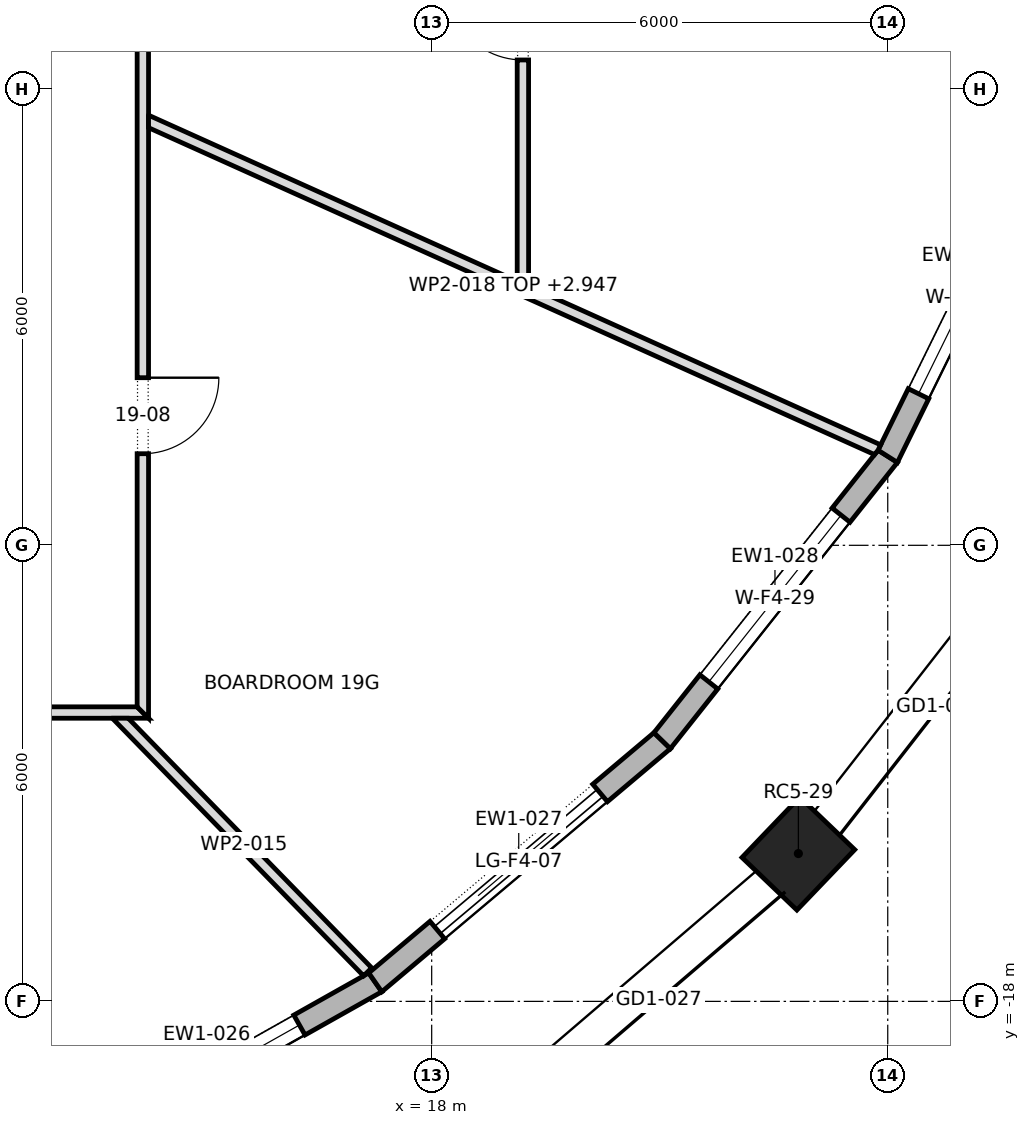
"""IFC4 building model, lengths in metres.
Left out: names, types, materials, properties, quantities, classifications, styles, units other than length and angle.
Written with IfcOpenShell. Run it as: python <this file> out.ifc"""

import sys

from ifc_helpers import new_model, si_unit, direction, frame, frame_2d, origin, origin_2d, place, context, subcontext, project, spatial, polyline, rectangle, outline, extrude, element, fill, save


model = new_model("IFC4")
c1 = context("Model", 3, precision=1e-05, world=origin(), true_north=direction((0.0, 1.0)))
c2 = subcontext(c1, "Body", "Model", "MODEL_VIEW")
j1 = project(units=[si_unit("LENGTHUNIT", "METRE"), si_unit("PLANEANGLEUNIT", "RADIAN")], contexts=[c1])
p1 = place(None, origin())
s1 = spatial("IfcSite", under=j1, at=p1, CompositionType="ELEMENT")
p2 = place(p1, origin())
s2 = spatial("IfcBuilding", under=s1, at=p2, CompositionType="ELEMENT")
p3 = place(p2, frame((0.0, 0.0, 276.3)))
s3 = spatial("IfcBuildingStorey", under=s2, at=p3, CompositionType="ELEMENT", Elevation=276.3)
p4 = place(p3, frame((22.824, -16.055, 0.0), z_axis=(0.0, 0.0, 1.0), x_axis=(0.691577351953, 0.722302406382, 0.0)))
e1 = element("IfcColumn", 1, at=p4, inside=s3, PredefinedType="COLUMN", context=c2, shape_type="SweptSolid", body=[
    extrude(rectangle(XDim=1.1, YDim=1.0, at=origin_2d()), origin(), (0.0, 0.0, 1.0), 4.0),
])
p5 = place(p3, frame((12.822, -20.246, 0.0), z_axis=(0.0, 0.0, 1.0), x_axis=(0.871433320402, 0.490513983585, 0.0)))
e2 = element("IfcWall", 2, at=p5, inside=s3, PredefinedType="STANDARD", context=c2, shape_type="SweptSolid", body=[
    extrude(outline(polyline([(-0.013, -0.15), (5.104, -0.15), (5.076, 0.15), (0.013, 0.15), (-0.013, -0.15)])), origin(), (0.0, 0.0, 1.0), 3.7),
])
p6 = place(p5, frame((1.145, 0.0, 0.6)))
e3 = element("IfcOpeningElement", 3, at=p6, cuts=e2, PredefinedType="OPENING", context=c2, shape_type="SweptSolid", body=[
    extrude(rectangle(XDim=2.8, YDim=2.65, at=frame_2d((1.4, 1.325))), frame((0.0, 0.162, 0.0), z_axis=(0.0, -1.0, 0.0), x_axis=(1.0, 0.0, 0.0)), (0.0, 0.0, 1.0), 0.324),
])
p7 = place(p3, frame((17.258, -17.75, 0.0), z_axis=(0.0, 0.0, 1.0), x_axis=(0.764832940795, 0.644228664897, 0.0)))
e4 = element("IfcWall", 4, at=p7, inside=s3, PredefinedType="STANDARD", context=c2, shape_type="SweptSolid", body=[
    extrude(outline(polyline([(-0.014, -0.15), (4.95, -0.15), (4.92, 0.15), (0.014, 0.15), (-0.014, -0.15)])), origin(), (0.0, 0.0, 1.0), 3.7),
])
p8 = place(p7, frame((1.068, 0.0, 0.0)))
e5 = element("IfcOpeningElement", 5, at=p8, cuts=e4, PredefinedType="OPENING", context=c2, shape_type="SweptSolid", body=[
    extrude(rectangle(XDim=2.8, YDim=3.25, at=frame_2d((1.4, 1.625))), frame((0.0, 0.162, 0.0), z_axis=(0.0, -1.0, 0.0), x_axis=(1.0, 0.0, 0.0)), (0.0, 0.0, 1.0), 0.324),
])
p9 = place(p3, frame((21.032, -14.57, 0.0), z_axis=(0.0, 0.0, 1.0), x_axis=(0.621434755851, 0.783465917715, 0.0)))
e6 = element("IfcWall", 6, at=p9, inside=s3, PredefinedType="STANDARD", context=c2, shape_type="SweptSolid", body=[
    extrude(outline(polyline([(-0.015, -0.15), (4.791, -0.15), (4.759, 0.15), (0.015, 0.15), (-0.015, -0.15)])), origin(), (0.0, 0.0, 1.0), 3.7),
])
p10 = place(p9, frame((0.987, 0.0, 0.6)))
e7 = element("IfcOpeningElement", 7, at=p10, cuts=e6, PredefinedType="OPENING", context=c2, shape_type="SweptSolid", body=[
    extrude(rectangle(XDim=2.8, YDim=2.65, at=frame_2d((1.4, 1.325))), frame((0.0, 0.162, 0.0), z_axis=(0.0, -1.0, 0.0), x_axis=(1.0, 0.0, 0.0)), (0.0, 0.0, 1.0), 0.324),
])
p11 = place(p3, frame((24.0, -10.829, 0.0), z_axis=(0.0, 0.0, 1.0), x_axis=(0.441261940724, 0.897378348117, 0.0)))
e8 = element("IfcWall", 8, at=p11, inside=s3, PredefinedType="STANDARD", context=c2, shape_type="SweptSolid", body=[
    extrude(outline(polyline([(-0.016, -0.15), (4.652, -0.15), (4.618, 0.15), (0.016, 0.15), (-0.016, -0.15)])), origin(), (0.0, 0.0, 1.0), 3.7),
])
p12 = place(p11, frame((0.917, 0.0, 0.6)))
e9 = element("IfcOpeningElement", 9, at=p12, cuts=e8, PredefinedType="OPENING", context=c2, shape_type="SweptSolid", body=[
    extrude(rectangle(XDim=2.8, YDim=2.65, at=frame_2d((1.4, 1.325))), frame((0.0, 0.162, 0.0), z_axis=(0.0, -1.0, 0.0), x_axis=(1.0, 0.0, 0.0)), (0.0, 0.0, 1.0), 0.324),
])
p13 = place(p3, frame((-14.275, -14.2, 0.0), z_axis=(0.0, 0.0, 1.0), x_axis=(1.0, 0.0, 0.0)))
e10 = element("IfcWall", 10, at=p13, inside=s3, PredefinedType="PARTITIONING", context=c2, shape_type="SweptSolid", body=[
    extrude(outline(polyline([(28.55, -0.075), (28.55, -0.075), (28.4, 0.075), (26.517, 0.075), (24.633, 0.075), (22.75, 0.075), (20.866, 0.075), (18.983, 0.075), (17.1, 0.075), (15.217, 0.075), (13.333, 0.075), (11.45, 0.075), (9.567, 0.075), (7.683, 0.075), (5.8, 0.075), (3.917, 0.075), (2.033, 0.075), (0.15, 0.075), (0.0, -0.075), (1.903, -0.075), (3.807, -0.075), (5.71, -0.075), (7.613, -0.075), (9.517, -0.075), (11.42, -0.075), (13.323, -0.075), (15.227, -0.075), (17.13, -0.075), (19.033, -0.075), (20.937, -0.075), (22.84, -0.075), (24.743, -0.075), (26.646, -0.075), (28.55, -0.075)])), origin(), (0.0, 0.0, 1.0), 3.7),
])
p14 = place(p13, frame((4.305, 0.0, 0.0)))
e11 = element("IfcOpeningElement", 11, at=p14, cuts=e10, PredefinedType="OPENING", context=c2, shape_type="SweptSolid", body=[
    extrude(rectangle(XDim=1.0, YDim=2.1, at=frame_2d((0.5, 1.05))), frame((0.0, 0.087, 0.0), z_axis=(0.0, -1.0, 0.0), x_axis=(1.0, 0.0, 0.0)), (0.0, 0.0, 1.0), 0.174),
])
p15 = place(p13, frame((17.735, 0.0, 0.0)))
e12 = element("IfcOpeningElement", 12, at=p15, cuts=e10, PredefinedType="OPENING", context=c2, shape_type="SweptSolid", body=[
    extrude(rectangle(XDim=1.8, YDim=2.1, at=frame_2d((0.9, 1.05))), frame((0.0, 0.087, 0.0), z_axis=(0.0, -1.0, 0.0), x_axis=(1.0, 0.0, 0.0)), (0.0, 0.0, 1.0), 0.174),
])
p16 = place(p3, frame((13.852, -14.223, 0.0), z_axis=(0.0, 0.0, 1.0), x_axis=(0.69820654799, -0.715896372629, 0.0)))
e13 = element("IfcWall", 13, at=p16, inside=s3, PredefinedType="PARTITIONING", context=c2, shape_type="SweptSolid", body=[
    extrude(outline(polyline([(0.0, -0.075), (1.578, -0.075), (3.156, -0.075), (4.734, -0.075), (4.734, -0.075), (4.734, 0.075), (3.205, 0.075), (1.675, 0.075), (0.146, 0.075), (0.0, -0.075), (0.0, -0.075)])), origin(), (0.0, 0.0, 1.0), 3.7),
])
p17 = place(p3, frame((14.2, -14.275, 0.0), z_axis=(0.0, 0.0, 1.0), x_axis=(0.0, 1.0, 0.0)))
e14 = element("IfcWall", 14, at=p17, inside=s3, PredefinedType="PARTITIONING", context=c2, shape_type="SweptSolid", body=[
    extrude(outline(polyline([(28.55, -0.075), (28.55, -0.075), (28.4, 0.075), (26.517, 0.075), (24.633, 0.075), (22.75, 0.075), (20.866, 0.075), (18.983, 0.075), (17.1, 0.075), (15.217, 0.075), (13.333, 0.075), (11.45, 0.075), (9.567, 0.075), (7.683, 0.075), (5.8, 0.075), (3.917, 0.075), (2.033, 0.075), (0.15, 0.075), (0.0, -0.075), (1.903, -0.075), (3.807, -0.075), (5.71, -0.075), (7.613, -0.075), (9.517, -0.075), (11.42, -0.075), (13.323, -0.075), (15.227, -0.075), (17.13, -0.075), (19.033, -0.075), (20.937, -0.075), (22.84, -0.075), (24.743, -0.075), (26.646, -0.075), (28.55, -0.075)])), origin(), (0.0, 0.0, 1.0), 3.7),
])
p18 = place(p17, frame((3.48, 0.0, 0.0)))
e15 = element("IfcOpeningElement", 15, at=p18, cuts=e14, PredefinedType="OPENING", context=c2, shape_type="SweptSolid", body=[
    extrude(rectangle(XDim=1.0, YDim=2.1, at=frame_2d((0.5, 1.05))), frame((0.0, 0.087, 0.0), z_axis=(0.0, -1.0, 0.0), x_axis=(1.0, 0.0, 0.0)), (0.0, 0.0, 1.0), 0.174),
])
p19 = place(p17, frame((9.99, 0.0, 0.0)))
e16 = element("IfcOpeningElement", 16, at=p19, cuts=e14, PredefinedType="OPENING", context=c2, shape_type="SweptSolid", body=[
    extrude(rectangle(XDim=1.0, YDim=2.1, at=frame_2d((0.5, 1.05))), frame((0.0, 0.087, 0.0), z_axis=(0.0, -1.0, 0.0), x_axis=(1.0, 0.0, 0.0)), (0.0, 0.0, 1.0), 0.174),
])
p20 = place(p17, frame((15.0, 0.0, 0.0)))
e17 = element("IfcOpeningElement", 17, at=p20, cuts=e14, PredefinedType="OPENING", context=c2, shape_type="SweptSolid", body=[
    extrude(rectangle(XDim=1.0, YDim=2.1, at=frame_2d((0.5, 1.05))), frame((0.0, 0.087, 0.0), z_axis=(0.0, -1.0, 0.0), x_axis=(1.0, 0.0, 0.0)), (0.0, 0.0, 1.0), 0.174),
])
p21 = place(p17, frame((22.69, 0.0, 0.0)))
e18 = element("IfcOpeningElement", 18, at=p21, cuts=e14, PredefinedType="OPENING", context=c2, shape_type="SweptSolid", body=[
    extrude(rectangle(XDim=1.0, YDim=2.1, at=frame_2d((0.5, 1.05))), frame((0.0, 0.087, 0.0), z_axis=(0.0, -1.0, 0.0), x_axis=(1.0, 0.0, 0.0)), (0.0, 0.0, 1.0), 0.174),
])
p22 = place(p3, frame((14.245, -6.41, 0.0), z_axis=(0.0, 0.0, 1.0), x_axis=(0.91183931518, -0.410547272908, 0.0)))
e19 = element("IfcWall", 19, at=p22, inside=s3, PredefinedType="PARTITIONING", context=c2, shape_type="SweptSolid", body=[
    extrude(outline(polyline([(0.067, -0.075), (1.813, -0.075), (3.559, -0.075), (5.304, -0.075), (7.05, -0.075), (8.796, -0.075), (10.542, -0.075), (10.56, -0.003), (10.562, 0.073), (10.562, 0.075), (8.816, 0.075), (7.07, 0.075), (5.324, 0.075), (5.319, 0.073), (5.318, 0.075), (3.546, 0.075), (1.773, 0.075), (0.0, 0.075), (0.0, 0.074), (0.067, -0.075)])), origin(), (0.0, 0.0, 1.0), 2.947),
])
p23 = place(p3, frame((19.2, -1.664, 0.0), z_axis=(0.0, 0.0, 1.0), x_axis=(0.0, -1.0, 0.0)))
e20 = element("IfcWall", 20, at=p23, inside=s3, PredefinedType="PARTITIONING", context=c2, shape_type="SweptSolid", body=[
    extrude(outline(polyline([(0.0, -0.075), (1.715, -0.075), (3.431, -0.075), (5.146, -0.075), (6.862, -0.075), (6.929, 0.074), (6.929, 0.075), (5.2, 0.075), (3.47, 0.075), (1.741, 0.075), (0.012, 0.075), (0.0, -0.07), (0.0, -0.075)])), origin(), (0.0, 0.0, 1.0), 3.7),
])
p24 = place(p23, frame((2.951, 0.0, 0.0)))
e21 = element("IfcOpeningElement", 21, at=p24, cuts=e20, PredefinedType="OPENING", context=c2, shape_type="SweptSolid", body=[
    extrude(rectangle(XDim=1.0, YDim=2.1, at=frame_2d((0.5, 1.05))), frame((0.0, 0.087, 0.0), z_axis=(0.0, -1.0, 0.0), x_axis=(1.0, 0.0, 0.0)), (0.0, 0.0, 1.0), 0.174),
])
p25 = place(p6, origin())
e22 = element("IfcWindow", 22, at=p25, inside=s3, PartitioningType="DOUBLE_PANEL_VERTICAL", PredefinedType="WINDOW", context=c2, shape_type="SweptSolid", body=[
    extrude(rectangle(XDim=2.8, YDim=2.65, at=frame_2d((1.4, 1.325))), frame((0.0, 0.03, 0.0), z_axis=(0.0, -1.0, 0.0), x_axis=(1.0, 0.0, 0.0)), (0.0, 0.0, 1.0), 0.06),
])
fill(e3, e22)
p26 = place(p8, origin())
e23 = element("IfcDoor", 23, at=p26, inside=s3, OperationType="DOUBLE_DOOR_SLIDING", PredefinedType="DOOR", context=c2, shape_type="SweptSolid", body=[
    extrude(rectangle(XDim=2.8, YDim=3.25, at=frame_2d((1.4, 1.625))), frame((0.0, 0.025, 0.0), z_axis=(0.0, -1.0, 0.0), x_axis=(1.0, 0.0, 0.0)), (0.0, 0.0, 1.0), 0.05),
])
fill(e5, e23)
p27 = place(p10, origin())
e24 = element("IfcWindow", 24, at=p27, inside=s3, PartitioningType="DOUBLE_PANEL_VERTICAL", PredefinedType="WINDOW", context=c2, shape_type="SweptSolid", body=[
    extrude(rectangle(XDim=2.8, YDim=2.65, at=frame_2d((1.4, 1.325))), frame((0.0, 0.03, 0.0), z_axis=(0.0, -1.0, 0.0), x_axis=(1.0, 0.0, 0.0)), (0.0, 0.0, 1.0), 0.06),
])
fill(e7, e24)
p28 = place(p12, origin())
e25 = element("IfcWindow", 25, at=p28, inside=s3, PartitioningType="DOUBLE_PANEL_VERTICAL", PredefinedType="WINDOW", context=c2, shape_type="SweptSolid", body=[
    extrude(rectangle(XDim=2.8, YDim=2.65, at=frame_2d((1.4, 1.325))), frame((0.0, 0.03, 0.0), z_axis=(0.0, -1.0, 0.0), x_axis=(1.0, 0.0, 0.0)), (0.0, 0.0, 1.0), 0.06),
])
fill(e9, e25)
p29 = place(p18, frame((1.0, 0.0, 0.0), z_axis=(0.0, 0.0, 1.0), x_axis=(-1.0, 0.0, 0.0)))
e26 = element("IfcDoor", 26, at=p29, inside=s3, OperationType="SINGLE_SWING_RIGHT", PredefinedType="DOOR", context=c2, shape_type="SweptSolid", body=[
    extrude(rectangle(XDim=1.0, YDim=2.1, at=frame_2d((0.5, 1.05))), frame((0.0, 0.025, 0.0), z_axis=(0.0, -1.0, 0.0), x_axis=(1.0, 0.0, 0.0)), (0.0, 0.0, 1.0), 0.05),
])
fill(e15, e26)
p30 = place(p24, frame((1.0, 0.0, 0.0), z_axis=(0.0, 0.0, 1.0), x_axis=(-1.0, 0.0, 0.0)))
e27 = element("IfcDoor", 27, at=p30, inside=s3, OperationType="SINGLE_SWING_LEFT", PredefinedType="DOOR", context=c2, shape_type="SweptSolid", body=[
    extrude(rectangle(XDim=1.0, YDim=2.1, at=frame_2d((0.5, 1.05))), frame((0.0, 0.025, 0.0), z_axis=(0.0, -1.0, 0.0), x_axis=(1.0, 0.0, 0.0)), (0.0, 0.0, 1.0), 0.05),
])
fill(e21, e27)
save(model, sys.argv[1])
